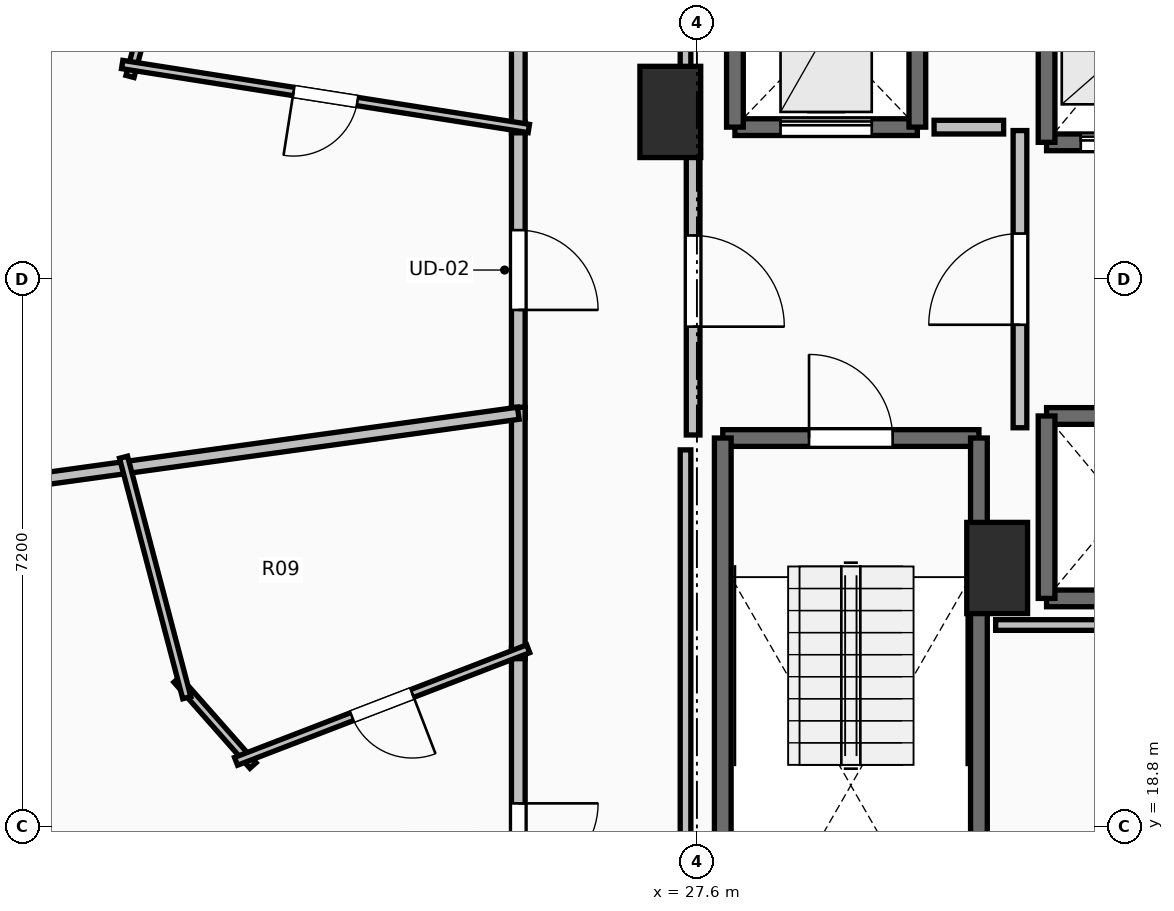
"""IFC4 building model, lengths in metres.
Left out: names, types, materials, properties, quantities, classifications, styles, units other than length and angle.
Written with IfcOpenShell. Run it as: python <this file> out.ifc"""

import sys

from ifc_helpers import new_model, si_unit, direction, frame, frame_2d, origin, origin_2d, place, context, subcontext, project, spatial, rectangle, extrude, element, fill, save


model = new_model("IFC4")
c1 = context("Model", 3, precision=1e-05, world=origin(), true_north=direction((0.0, 1.0)))
c2 = subcontext(c1, "Body", "Model", "MODEL_VIEW")
j1 = project(units=[si_unit("LENGTHUNIT", "METRE"), si_unit("PLANEANGLEUNIT", "RADIAN")], contexts=[c1])
p1 = place(None, origin())
s1 = spatial("IfcSite", under=j1, at=p1, CompositionType="ELEMENT")
p2 = place(p1, origin())
s2 = spatial("IfcBuilding", under=s1, at=p2, CompositionType="ELEMENT")
p3 = place(p2, frame((0.0, 0.0, 89.3)))
s3 = spatial("IfcBuildingStorey", under=s2, at=p3, CompositionType="ELEMENT", Elevation=89.3)
for number, where, z_axis, x_axis in (
    (1, (27.25, 28.2, 0.0), (0.0, 0.0, 1.0), (1.0, 0.0, 0.0)),
    (2, (31.55, 22.2, 0.0), (0.0, 0.0, 1.0), (1.0, 0.0, 0.0)),
):
    element("IfcColumn", number, at=place(p3, frame(where, z_axis=z_axis, x_axis=x_axis)), inside=s3, PredefinedType="PILASTER", context=c2, shape_type="SweptSolid", body=[
        extrude(rectangle(XDim=0.8, YDim=1.2, at=origin_2d()), origin(), (0.0, 0.0, 1.0), 3.5),
    ])
p4 = place(p3, frame((27.94, 23.91, 0.0), z_axis=(0.0, 0.0, 1.0), x_axis=(1.0, 0.0, 0.0)))
e3 = element("IfcWall", 3, at=p4, inside=s3, PredefinedType="SOLIDWALL", context=c2, shape_type="SweptSolid", body=[
    extrude(rectangle(XDim=3.37, YDim=0.22, at=frame_2d((1.685, 0.0))), origin(), (0.0, 0.0, 1.0), 3.24),
])
p5 = place(p4, frame((1.135, 0.0, 0.0)))
e4 = element("IfcOpeningElement", 4, at=p5, cuts=e3, PredefinedType="OPENING", context=c2, shape_type="SweptSolid", body=[
    extrude(rectangle(XDim=1.1, YDim=2.15, at=frame_2d((0.55, 1.075))), frame((0.0, 0.125, 0.0), z_axis=(0.0, -1.0, 0.0), x_axis=(1.0, 0.0, 0.0)), (0.0, 0.0, 1.0), 0.25),
])
for number, where, z_axis, x_axis in (
    (5, (31.31, 23.91, 0.0), (0.0, 0.0, 1.0), (0.0, -1.0, 0.0)),
    (6, (27.94, 16.49, 0.0), (0.0, 0.0, 1.0), (0.0, 1.0, 0.0)),
):
    element("IfcWall", number, at=place(p3, frame(where, z_axis=z_axis, x_axis=x_axis)), inside=s3, PredefinedType="SOLIDWALL", context=c2, shape_type="SweptSolid", body=[
        extrude(rectangle(XDim=7.42, YDim=0.22, at=frame_2d((3.71, 0.0))), origin(), (0.0, 0.0, 1.0), 3.24),
    ])
p6 = place(p3, frame((32.2, 27.8, 0.0), z_axis=(0.0, 0.0, 1.0), x_axis=(1.0, 0.0, 0.0)))
e7 = element("IfcWall", 7, at=p6, inside=s3, PredefinedType="SOLIDWALL", context=c2, shape_type="SweptSolid", body=[
    extrude(rectangle(XDim=2.0, YDim=0.22, at=frame_2d((1.0, 0.0))), origin(), (0.0, 0.0, 1.0), 3.24),
])
p7 = place(p6, frame((0.45, 0.0, 0.0)))
e8 = element("IfcOpeningElement", 8, at=p7, cuts=e7, PredefinedType="OPENING", context=c2, shape_type="SweptSolid", body=[
    extrude(rectangle(XDim=1.1, YDim=2.2, at=frame_2d((0.55, 1.1))), frame((0.0, 0.125, 0.0), z_axis=(0.0, -1.0, 0.0), x_axis=(1.0, 0.0, 0.0)), (0.0, 0.0, 1.0), 0.25),
])
p8 = place(p3, frame((32.2, 30.2, 0.0), z_axis=(0.0, 0.0, 1.0), x_axis=(0.0, -1.0, 0.0)))
e9 = element("IfcWall", 9, at=p8, inside=s3, PredefinedType="SOLIDWALL", context=c2, shape_type="SweptSolid", body=[
    extrude(rectangle(XDim=2.4, YDim=0.22, at=frame_2d((1.2, 0.0))), origin(), (0.0, 0.0, 1.0), 3.24),
])
for number, where, z_axis, x_axis in (
    (10, (32.2, 21.8, 0.0), (0.0, 0.0, 1.0), (1.0, 0.0, 0.0)),
    (11, (34.2, 24.2, 0.0), (0.0, 0.0, 1.0), (-1.0, 0.0, 0.0)),
):
    element("IfcWall", number, at=place(p3, frame(where, z_axis=z_axis, x_axis=x_axis)), inside=s3, PredefinedType="SOLIDWALL", context=c2, shape_type="SweptSolid", body=[
        extrude(rectangle(XDim=2.0, YDim=0.22, at=frame_2d((1.0, 0.0))), origin(), (0.0, 0.0, 1.0), 3.24),
    ])
p9 = place(p3, frame((32.2, 24.2, 0.0), z_axis=(0.0, 0.0, 1.0), x_axis=(0.0, -1.0, 0.0)))
e12 = element("IfcWall", 12, at=p9, inside=s3, PredefinedType="SOLIDWALL", context=c2, shape_type="SweptSolid", body=[
    extrude(rectangle(XDim=2.4, YDim=0.22, at=frame_2d((1.2, 0.0))), origin(), (0.0, 0.0, 1.0), 3.24),
])
p10 = place(p3, frame((28.1, 28.0, 0.0), z_axis=(0.0, 0.0, 1.0), x_axis=(1.0, 0.0, 0.0)))
e13 = element("IfcWall", 13, at=p10, inside=s3, PredefinedType="SHEAR", context=c2, shape_type="SweptSolid", body=[
    extrude(rectangle(XDim=2.4, YDim=0.22, at=frame_2d((1.2, 0.0))), origin(), (0.0, 0.0, 1.0), 3.24),
])
p11 = place(p10, frame((0.6, 0.0, 0.0)))
e14 = element("IfcOpeningElement", 14, at=p11, cuts=e13, PredefinedType="OPENING", context=c2, shape_type="SweptSolid", body=[
    extrude(rectangle(XDim=1.2, YDim=2.2, at=frame_2d((0.6, 1.1))), frame((0.0, 0.125, 0.0), z_axis=(0.0, -1.0, 0.0), x_axis=(1.0, 0.0, 0.0)), (0.0, 0.0, 1.0), 0.25),
])
for number, where, z_axis, x_axis in (
    (15, (30.5, 28.0, 0.0), (0.0, 0.0, 1.0), (0.0, 1.0, 0.0)),
    (16, (28.1, 30.5, 0.0), (0.0, 0.0, 1.0), (0.0, -1.0, 0.0)),
):
    element("IfcWall", number, at=place(p3, frame(where, z_axis=z_axis, x_axis=x_axis)), inside=s3, PredefinedType="SHEAR", context=c2, shape_type="SweptSolid", body=[
        extrude(rectangle(XDim=2.5, YDim=0.22, at=frame_2d((1.25, 0.0))), origin(), (0.0, 0.0, 1.0), 3.24),
    ])
p12 = place(p3, frame((31.85, 24.045, 0.0), z_axis=(0.0, 0.0, 1.0), x_axis=(0.0, 1.0, 0.0)))
e17 = element("IfcWall", 17, at=p12, inside=s3, PredefinedType="PARTITIONING", context=c2, shape_type="SweptSolid", body=[
    extrude(rectangle(XDim=3.91, YDim=0.18, at=frame_2d((1.955, 0.0))), origin(), (0.0, 0.0, 1.0), 3.24),
])
p13 = place(p12, frame((1.355, 0.0, 0.0)))
e18 = element("IfcOpeningElement", 18, at=p13, cuts=e17, PredefinedType="OPENING", context=c2, shape_type="SweptSolid", body=[
    extrude(rectangle(XDim=1.2, YDim=2.15, at=frame_2d((0.6, 1.075))), frame((0.0, 0.105, 0.0), z_axis=(0.0, -1.0, 0.0), x_axis=(1.0, 0.0, 0.0)), (0.0, 0.0, 1.0), 0.21),
])
p14 = place(p3, frame((27.55, 28.0, 0.0), z_axis=(0.0, 0.0, 1.0), x_axis=(0.0, -1.0, 0.0)))
e19 = element("IfcWall", 19, at=p14, inside=s3, PredefinedType="PARTITIONING", context=c2, shape_type="SweptSolid", body=[
    extrude(rectangle(XDim=4.05, YDim=0.18, at=frame_2d((2.025, 0.0))), origin(), (0.0, 0.0, 1.0), 3.24),
])
p15 = place(p14, frame((1.425, 0.0, 0.0)))
e20 = element("IfcOpeningElement", 20, at=p15, cuts=e19, PredefinedType="OPENING", context=c2, shape_type="SweptSolid", body=[
    extrude(rectangle(XDim=1.2, YDim=2.15, at=frame_2d((0.6, 1.075))), frame((0.0, 0.105, 0.0), z_axis=(0.0, -1.0, 0.0), x_axis=(1.0, 0.0, 0.0)), (0.0, 0.0, 1.0), 0.21),
])
p16 = place(p3, frame((25.25, 28.065, 0.0), z_axis=(0.0, 0.0, 1.0), x_axis=(0.0, -1.0, 0.0)))
e21 = element("IfcWall", 21, at=p16, inside=s3, PredefinedType="PARTITIONING", context=c2, shape_type="SweptSolid", body=[
    extrude(rectangle(XDim=3.89, YDim=0.18, at=frame_2d((1.945, 0.0))), origin(), (0.0, 0.0, 1.0), 2.432),
])
p17 = place(p16, frame((1.42, 0.0, 0.0)))
e22 = element("IfcOpeningElement", 22, at=p17, cuts=e21, PredefinedType="OPENING", context=c2, shape_type="SweptSolid", body=[
    extrude(rectangle(XDim=1.05, YDim=2.2, at=frame_2d((0.525, 1.1))), frame((0.0, 0.105, 0.0), z_axis=(0.0, -1.0, 0.0), x_axis=(1.0, 0.0, 0.0)), (0.0, 0.0, 1.0), 0.21),
])
p18 = place(p3, frame((25.25, 31.268, 0.0), z_axis=(0.0, 0.0, 1.0), x_axis=(0.0, -1.0, 0.0)))
e23 = element("IfcWall", 23, at=p18, inside=s3, PredefinedType="PARTITIONING", context=c2, shape_type="SweptSolid", body=[
    extrude(rectangle(XDim=3.343, YDim=0.18, at=frame_2d((1.671, 0.0))), origin(), (0.0, 0.0, 1.0), 2.432),
])
p19 = place(p3, frame((25.25, 21.147, 0.0), z_axis=(0.0, 0.0, 1.0), x_axis=(0.0, -1.0, 0.0)))
e24 = element("IfcWall", 24, at=p19, inside=s3, PredefinedType="PARTITIONING", context=c2, shape_type="SweptSolid", body=[
    extrude(rectangle(XDim=5.137, YDim=0.18, at=frame_2d((2.568, 0.0))), origin(), (0.0, 0.0, 1.0), 2.432),
])
p20 = place(p19, frame((2.043, 0.0, 0.0)))
e25 = element("IfcOpeningElement", 25, at=p20, cuts=e24, PredefinedType="OPENING", context=c2, shape_type="SweptSolid", body=[
    extrude(rectangle(XDim=1.05, YDim=2.2, at=frame_2d((0.525, 1.1))), frame((0.0, 0.105, 0.0), z_axis=(0.0, -1.0, 0.0), x_axis=(1.0, 0.0, 0.0)), (0.0, 0.0, 1.0), 0.21),
])
p21 = place(p3, frame((25.25, 24.315, 0.0), z_axis=(0.0, 0.0, 1.0), x_axis=(0.0, -1.0, 0.0)))
e26 = element("IfcWall", 26, at=p21, inside=s3, PredefinedType="PARTITIONING", context=c2, shape_type="SweptSolid", body=[
    extrude(rectangle(XDim=3.308, YDim=0.18, at=frame_2d((1.654, 0.0))), origin(), (0.0, 0.0, 1.0), 3.24),
])
p22 = place(p3, frame((20.141, 28.667, 0.0), z_axis=(0.0, 0.0, 1.0), x_axis=(0.254489206931, 0.967075614187, 0.0)))
e27 = element("IfcWall", 27, at=p22, inside=s3, PredefinedType="PARTITIONING", context=c2, shape_type="SweptSolid", body=[
    extrude(rectangle(XDim=2.937, YDim=0.11, at=frame_2d((1.468, 0.0))), origin(), (0.0, 0.0, 1.0), 2.432),
])
p23 = place(p3, frame((25.388, 27.982, 0.0), z_axis=(0.0, 0.0, 1.0), x_axis=(-0.98785054141, 0.155406910513, 0.0)))
e28 = element("IfcWall", 28, at=p23, inside=s3, PredefinedType="PARTITIONING", context=c2, shape_type="SweptSolid", body=[
    extrude(rectangle(XDim=5.415, YDim=0.11, at=frame_2d((2.708, 0.0))), origin(), (0.0, 0.0, 1.0), 2.432),
])
p24 = place(p23, frame((2.283, 0.0, 0.0)))
e29 = element("IfcOpeningElement", 29, at=p24, cuts=e28, PredefinedType="OPENING", context=c2, shape_type="SweptSolid", body=[
    extrude(rectangle(XDim=0.85, YDim=2.1, at=frame_2d((0.425, 1.05))), frame((0.0, 0.07, 0.0), z_axis=(0.0, -1.0, 0.0), x_axis=(1.0, 0.0, 0.0)), (0.0, 0.0, 1.0), 0.14),
])
p25 = place(p3, frame((12.215, 22.433, 0.0), z_axis=(0.0, 0.0, 1.0), x_axis=(0.990569013426, 0.137014705927, 0.0)))
e30 = element("IfcWall", 30, at=p25, inside=s3, PredefinedType="PARTITIONING", context=c2, shape_type="SweptSolid", body=[
    extrude(rectangle(XDim=13.159, YDim=0.16, at=frame_2d((6.58, 0.0))), origin(), (0.0, 0.0, 1.0), 2.677),
])
p26 = place(p3, frame((21.76, 19.602, 0.0), z_axis=(0.0, 0.0, 1.0), x_axis=(-0.661931735756, 0.749564124808, 0.0)))
e31 = element("IfcWall", 31, at=p26, inside=s3, PredefinedType="PARTITIONING", context=c2, shape_type="SweptSolid", body=[
    extrude(rectangle(XDim=1.51, YDim=0.11, at=frame_2d((0.755, 0.0))), origin(), (0.0, 0.0, 1.0), 3.24),
])
p27 = place(p3, frame((20.889, 20.494, 0.0), z_axis=(0.0, 0.0, 1.0), x_axis=(-0.254405137241, 0.967097733502, 0.0)))
e32 = element("IfcWall", 32, at=p27, inside=s3, PredefinedType="PARTITIONING", context=c2, shape_type="SweptSolid", body=[
    extrude(rectangle(XDim=3.271, YDim=0.11, at=frame_2d((1.636, 0.0))), origin(), (0.0, 0.0, 1.0), 2.922),
])
p28 = place(p3, frame((25.381, 21.137, 0.0), z_axis=(0.0, 0.0, 1.0), x_axis=(-0.933189718051, -0.359384126144, 0.0)))
e33 = element("IfcWall", 33, at=p28, inside=s3, PredefinedType="PARTITIONING", context=c2, shape_type="SweptSolid", body=[
    extrude(rectangle(XDim=4.119, YDim=0.11, at=frame_2d((2.06, 0.0))), origin(), (0.0, 0.0, 1.0), 2.972),
])
p29 = place(p28, frame((1.635, 0.0, 0.0)))
e34 = element("IfcOpeningElement", 34, at=p29, cuts=e33, PredefinedType="OPENING", context=c2, shape_type="SweptSolid", body=[
    extrude(rectangle(XDim=0.85, YDim=2.1, at=frame_2d((0.425, 1.05))), frame((0.0, 0.07, 0.0), z_axis=(0.0, -1.0, 0.0), x_axis=(1.0, 0.0, 0.0)), (0.0, 0.0, 1.0), 0.14),
])
p30 = place(p3, frame((31.635, 28.0, 0.0), z_axis=(0.0, 0.0, 1.0), x_axis=(-1.0, 0.0, 0.0)))
e35 = element("IfcWall", 35, at=p30, inside=s3, PredefinedType="PARTITIONING", context=c2, shape_type="SweptSolid", body=[
    extrude(rectangle(XDim=0.915, YDim=0.18, at=frame_2d((0.458, 0.0))), origin(), (0.0, 0.0, 1.0), 3.24),
])
p31 = place(p3, frame((34.83, 21.45, 0.0), z_axis=(0.0, 0.0, 1.0), x_axis=(-1.0, 0.0, 0.0)))
e36 = element("IfcWall", 36, at=p31, inside=s3, PredefinedType="PARTITIONING", context=c2, shape_type="SweptSolid", body=[
    extrude(rectangle(XDim=3.3, YDim=0.14, at=frame_2d((1.65, 0.0))), origin(), (0.0, 0.0, 1.0), 3.24),
])
p32 = place(p3, frame((27.45, 16.24, 0.0), z_axis=(0.0, 0.0, 1.0), x_axis=(0.0, 1.0, 0.0)))
e37 = element("IfcWall", 37, at=p32, inside=s3, PredefinedType="PARTITIONING", context=c2, shape_type="SweptSolid", body=[
    extrude(rectangle(XDim=7.514, YDim=0.14, at=frame_2d((3.757, 0.0))), origin(), (0.0, 0.0, 1.0), 2.432),
])
p33 = place(p3, frame((27.45, 28.196, 0.0), z_axis=(0.0, 0.0, 1.0), x_axis=(0.0, 1.0, 0.0)))
e38 = element("IfcWall", 38, at=p33, inside=s3, PredefinedType="PARTITIONING", context=c2, shape_type="SweptSolid", body=[
    extrude(rectangle(XDim=5.254, YDim=0.14, at=frame_2d((2.627, 0.0))), origin(), (0.0, 0.0, 1.0), 2.432),
])
p34 = place(p5, origin())
e39 = element("IfcDoor", 39, at=p34, inside=s3, OperationType="SINGLE_SWING_LEFT", PredefinedType="DOOR", context=c2, shape_type="SweptSolid", body=[
    extrude(rectangle(XDim=1.1, YDim=2.15, at=frame_2d((0.55, 1.075))), frame((0.0, 0.025, 0.0), z_axis=(0.0, -1.0, 0.0), x_axis=(1.0, 0.0, 0.0)), (0.0, 0.0, 1.0), 0.05),
])
fill(e4, e39)
p35 = place(p7, origin())
e40 = element("IfcDoor", 40, at=p35, inside=s3, OperationType="SLIDING_TO_LEFT", PredefinedType="DOOR", context=c2, shape_type="SweptSolid", body=[
    extrude(rectangle(XDim=1.1, YDim=2.2, at=frame_2d((0.55, 1.1))), frame((0.0, 0.025, 0.0), z_axis=(0.0, -1.0, 0.0), x_axis=(1.0, 0.0, 0.0)), (0.0, 0.0, 1.0), 0.05),
])
fill(e8, e40)
p36 = place(p11, origin())
e41 = element("IfcDoor", 41, at=p36, inside=s3, OperationType="SLIDING_TO_LEFT", PredefinedType="DOOR", context=c2, shape_type="SweptSolid", body=[
    extrude(rectangle(XDim=1.2, YDim=2.2, at=frame_2d((0.6, 1.1))), frame((0.0, 0.025, 0.0), z_axis=(0.0, -1.0, 0.0), x_axis=(1.0, 0.0, 0.0)), (0.0, 0.0, 1.0), 0.05),
])
fill(e14, e41)
p37 = place(p13, origin())
e42 = element("IfcDoor", 42, at=p37, inside=s3, OperationType="SINGLE_SWING_LEFT", PredefinedType="DOOR", context=c2, shape_type="SweptSolid", body=[
    extrude(rectangle(XDim=1.2, YDim=2.15, at=frame_2d((0.6, 1.075))), frame((0.0, 0.025, 0.0), z_axis=(0.0, -1.0, 0.0), x_axis=(1.0, 0.0, 0.0)), (0.0, 0.0, 1.0), 0.05),
])
fill(e18, e42)
p38 = place(p15, origin())
e43 = element("IfcDoor", 43, at=p38, inside=s3, OperationType="SINGLE_SWING_RIGHT", PredefinedType="DOOR", context=c2, shape_type="SweptSolid", body=[
    extrude(rectangle(XDim=1.2, YDim=2.15, at=frame_2d((0.6, 1.075))), frame((0.0, 0.025, 0.0), z_axis=(0.0, -1.0, 0.0), x_axis=(1.0, 0.0, 0.0)), (0.0, 0.0, 1.0), 0.05),
])
fill(e20, e43)
p39 = place(p17, origin())
e44 = element("IfcDoor", 44, at=p39, inside=s3, OperationType="SINGLE_SWING_RIGHT", PredefinedType="DOOR", context=c2, shape_type="SweptSolid", body=[
    extrude(rectangle(XDim=1.05, YDim=2.2, at=frame_2d((0.525, 1.1))), frame((0.0, 0.025, 0.0), z_axis=(0.0, -1.0, 0.0), x_axis=(1.0, 0.0, 0.0)), (0.0, 0.0, 1.0), 0.05),
])
fill(e22, e44)
p40 = place(p20, origin())
e45 = element("IfcDoor", 45, at=p40, inside=s3, OperationType="SINGLE_SWING_LEFT", PredefinedType="DOOR", context=c2, shape_type="SweptSolid", body=[
    extrude(rectangle(XDim=1.05, YDim=2.2, at=frame_2d((0.525, 1.1))), frame((0.0, 0.025, 0.0), z_axis=(0.0, -1.0, 0.0), x_axis=(1.0, 0.0, 0.0)), (0.0, 0.0, 1.0), 0.05),
])
fill(e25, e45)
p41 = place(p24, origin())
e46 = element("IfcDoor", 46, at=p41, inside=s3, OperationType="SINGLE_SWING_RIGHT", PredefinedType="DOOR", context=c2, shape_type="SweptSolid", body=[
    extrude(rectangle(XDim=0.85, YDim=2.1, at=frame_2d((0.425, 1.05))), frame((0.0, 0.025, 0.0), z_axis=(0.0, -1.0, 0.0), x_axis=(1.0, 0.0, 0.0)), (0.0, 0.0, 1.0), 0.05),
])
fill(e29, e46)
p42 = place(p29, origin())
e47 = element("IfcDoor", 47, at=p42, inside=s3, OperationType="SINGLE_SWING_LEFT", PredefinedType="DOOR", context=c2, shape_type="SweptSolid", body=[
    extrude(rectangle(XDim=0.85, YDim=2.1, at=frame_2d((0.425, 1.05))), frame((0.0, 0.025, 0.0), z_axis=(0.0, -1.0, 0.0), x_axis=(1.0, 0.0, 0.0)), (0.0, 0.0, 1.0), 0.05),
])
fill(e34, e47)
save(model, sys.argv[1])
